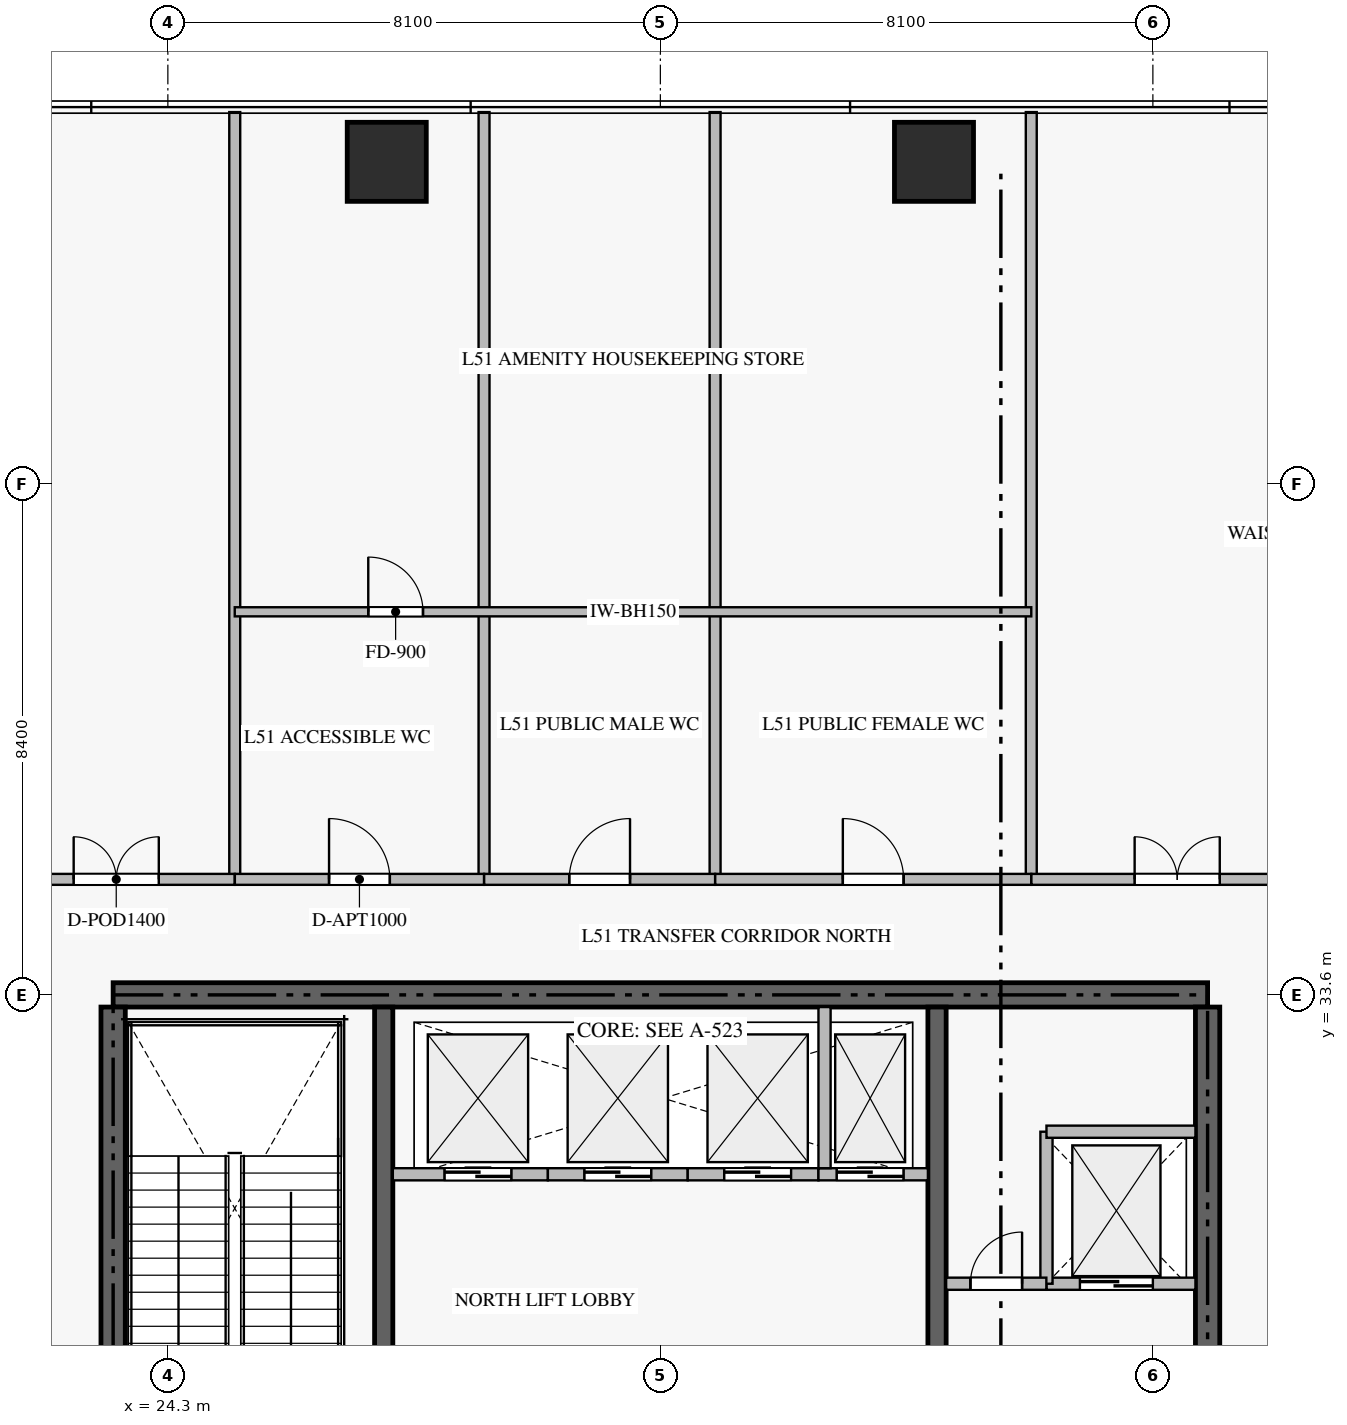
"""IFC4 building model, lengths in metres.
Left out: names, types, materials, properties, quantities, classifications, styles, units other than length and angle.
Written with IfcOpenShell. Run it as: python <this file> out.ifc"""

import sys

from ifc_helpers import new_model, si_unit, direction, frame, frame_2d, origin, origin_2d, place, context, subcontext, project, spatial, rectangle, extrude, source, transform, mapped, element, fill, save


model = new_model("IFC4")
c1 = context("Model", 3, precision=1e-05, world=origin(), true_north=direction((0.0, 1.0)))
c2 = subcontext(c1, "Body", "Model", "MODEL_VIEW")
j1 = project(units=[si_unit("LENGTHUNIT", "METRE"), si_unit("PLANEANGLEUNIT", "RADIAN")], contexts=[c1])
p1 = place(None, origin())
s1 = spatial("IfcSite", under=j1, at=p1, CompositionType="ELEMENT")
p2 = place(p1, origin())
s2 = spatial("IfcBuilding", under=s1, at=p2, CompositionType="ELEMENT")
p3 = place(p2, frame((0.0, 0.0, 204.9)))
s3 = spatial("IfcBuildingStorey", under=s2, at=p3, CompositionType="ELEMENT", Elevation=204.9)
p4 = place(p3, frame((41.4, 33.6, -0.36), z_axis=(0.0, 0.0, 1.0), x_axis=(-1.0, 0.0, 0.0)))
e1 = element("IfcWall", 1, at=p4, inside=s3, PredefinedType="SHEAR", context=c2, shape_type="SweptSolid", body=[
    extrude(rectangle(XDim=18.0, YDim=0.4, at=frame_2d((9.0, 0.0))), origin(), (0.0, 0.0, 1.0), 5.468),
])
p5 = place(p3, frame((23.4, 24.25, -0.36), z_axis=(0.0, 0.0, 1.0), x_axis=(0.0, 1.0, 0.0)))
e2 = element("IfcWall", 2, at=p5, inside=s3, PredefinedType="SHEAR", context=c2, shape_type="SweptSolid", body=[
    extrude(rectangle(XDim=9.15, YDim=0.4, at=frame_2d((4.575, 0.0))), origin(), (0.0, 0.0, 1.0), 5.468),
])
p6 = place(p3, frame((41.4, 27.75, -0.36), z_axis=(0.0, 0.0, 1.0), x_axis=(0.0, 1.0, 0.0)))
e3 = element("IfcWall", 3, at=p6, inside=s3, PredefinedType="SHEAR", context=c2, shape_type="SweptSolid", body=[
    extrude(rectangle(XDim=5.65, YDim=0.4, at=frame_2d((2.825, 0.0))), origin(), (0.0, 0.0, 1.0), 5.468),
])
p7 = place(p3, frame((27.85, 23.55, -0.36), z_axis=(0.0, 0.0, 1.0), x_axis=(0.0, 1.0, 0.0)))
e4 = element("IfcWall", 4, at=p7, inside=s3, PredefinedType="SHEAR", context=c2, shape_type="SweptSolid", body=[
    extrude(rectangle(XDim=9.85, YDim=0.3, at=frame_2d((4.925, 0.0))), origin(), (0.0, 0.0, 1.0), 5.468),
])
p8 = place(p3, frame((36.95, 27.05, -0.36), z_axis=(0.0, 0.0, 1.0), x_axis=(0.0, 1.0, 0.0)))
e5 = element("IfcWall", 5, at=p8, inside=s3, PredefinedType="SHEAR", context=c2, shape_type="SweptSolid", body=[
    extrude(rectangle(XDim=6.35, YDim=0.3, at=frame_2d((3.175, 0.0))), origin(), (0.0, 0.0, 1.0), 5.468),
])
m1 = source(origin(), c2, "Body", "SweptSolid", [
    extrude(rectangle(XDim=1.3, YDim=1.3, at=origin_2d()), origin(), (0.0, 0.0, 1.0), 5.47),
])
for number, where, z_axis, x_axis in (
    (6, (27.9, 47.3, -0.36), (0.0, 0.0, 1.0), (1.0, 0.0, 0.0)),
    (7, (36.9, 47.3, -0.36), (0.0, 0.0, 1.0), (1.0, 0.0, 0.0)),
):
    element("IfcColumn", number, at=place(p3, frame(where, z_axis=z_axis, x_axis=x_axis)), inside=s3, PredefinedType="COLUMN", context=c2, shape_type="MappedRepresentation", body=[
        mapped(m1, transform((0.0, 0.0, 0.0), scale=1.0)),
    ])
p9 = place(p3, frame((38.75, 28.85, 0.0), z_axis=(0.0, 0.0, 1.0), x_axis=(1.0, 0.0, 0.0)))
e8 = element("IfcWall", 8, at=p9, inside=s3, PredefinedType="STANDARD", context=c2, shape_type="SweptSolid", body=[
    extrude(rectangle(XDim=2.45, YDim=0.2, at=frame_2d((1.225, 0.0))), origin(), (0.0, 0.0, 1.0), 5.11),
])
p10 = place(p9, frame((0.55, 0.0, 0.0)))
e9 = element("IfcOpeningElement", 9, at=p10, cuts=e8, PredefinedType="OPENING", context=c2, shape_type="SweptSolid", body=[
    extrude(rectangle(XDim=1.2, YDim=2.2, at=frame_2d((0.6, 1.1))), frame((0.0, 0.11, 0.0), z_axis=(0.0, -1.0, 0.0), x_axis=(1.0, 0.0, 0.0)), (0.0, 0.0, 1.0), 0.22),
])
p11 = place(p3, frame((28.0, 30.65, 0.0), z_axis=(0.0, 0.0, 1.0), x_axis=(1.0, 0.0, 0.0)))
e10 = element("IfcWall", 10, at=p11, inside=s3, PredefinedType="STANDARD", context=c2, shape_type="SweptSolid", body=[
    extrude(rectangle(XDim=2.55, YDim=0.2, at=frame_2d((1.275, 0.0))), origin(), (0.0, 0.0, 1.0), 5.11),
])
p12 = place(p11, frame((0.85, 0.0, 0.0)))
e11 = element("IfcOpeningElement", 11, at=p12, cuts=e10, PredefinedType="OPENING", context=c2, shape_type="SweptSolid", body=[
    extrude(rectangle(XDim=1.1, YDim=2.2, at=frame_2d((0.55, 1.1))), frame((0.0, 0.11, 0.0), z_axis=(0.0, -1.0, 0.0), x_axis=(1.0, 0.0, 0.0)), (0.0, 0.0, 1.0), 0.22),
])
p13 = place(p3, frame((30.55, 30.65, 0.0), z_axis=(0.0, 0.0, 1.0), x_axis=(1.0, 0.0, 0.0)))
e12 = element("IfcWall", 12, at=p13, inside=s3, PredefinedType="STANDARD", context=c2, shape_type="SweptSolid", body=[
    extrude(rectangle(XDim=2.3, YDim=0.2, at=frame_2d((1.15, 0.0))), origin(), (0.0, 0.0, 1.0), 5.11),
])
p14 = place(p13, frame((0.6, 0.0, 0.0)))
e13 = element("IfcOpeningElement", 13, at=p14, cuts=e12, PredefinedType="OPENING", context=c2, shape_type="SweptSolid", body=[
    extrude(rectangle(XDim=1.1, YDim=2.2, at=frame_2d((0.55, 1.1))), frame((0.0, 0.11, 0.0), z_axis=(0.0, -1.0, 0.0), x_axis=(1.0, 0.0, 0.0)), (0.0, 0.0, 1.0), 0.22),
])
p15 = place(p3, frame((32.85, 30.65, 0.0), z_axis=(0.0, 0.0, 1.0), x_axis=(1.0, 0.0, 0.0)))
e14 = element("IfcWall", 14, at=p15, inside=s3, PredefinedType="STANDARD", context=c2, shape_type="SweptSolid", body=[
    extrude(rectangle(XDim=2.15, YDim=0.2, at=frame_2d((1.075, 0.0))), origin(), (0.0, 0.0, 1.0), 5.11),
])
p16 = place(p15, frame((0.6, 0.0, 0.0)))
e15 = element("IfcOpeningElement", 15, at=p16, cuts=e14, PredefinedType="OPENING", context=c2, shape_type="SweptSolid", body=[
    extrude(rectangle(XDim=1.1, YDim=2.2, at=frame_2d((0.55, 1.1))), frame((0.0, 0.11, 0.0), z_axis=(0.0, -1.0, 0.0), x_axis=(1.0, 0.0, 0.0)), (0.0, 0.0, 1.0), 0.22),
])
p17 = place(p3, frame((35.0, 30.65, 0.0), z_axis=(0.0, 0.0, 1.0), x_axis=(1.0, 0.0, 0.0)))
e16 = element("IfcWall", 16, at=p17, inside=s3, PredefinedType="STANDARD", context=c2, shape_type="SweptSolid", body=[
    extrude(rectangle(XDim=1.8, YDim=0.2, at=frame_2d((0.9, 0.0))), origin(), (0.0, 0.0, 1.0), 5.11),
])
p18 = place(p17, frame((0.3, 0.0, 0.0)))
e17 = element("IfcOpeningElement", 17, at=p18, cuts=e16, PredefinedType="OPENING", context=c2, shape_type="SweptSolid", body=[
    extrude(rectangle(XDim=1.1, YDim=2.2, at=frame_2d((0.55, 1.1))), frame((0.0, 0.11, 0.0), z_axis=(0.0, -1.0, 0.0), x_axis=(1.0, 0.0, 0.0)), (0.0, 0.0, 1.0), 0.22),
])
p19 = place(p3, frame((35.1, 30.75, 0.0), z_axis=(0.0, 0.0, 1.0), x_axis=(0.0, 1.0, 0.0)))
e18 = element("IfcWall", 18, at=p19, inside=s3, PredefinedType="STANDARD", context=c2, shape_type="SweptSolid", body=[
    extrude(rectangle(XDim=2.65, YDim=0.2, at=frame_2d((1.325, 0.0))), origin(), (0.0, 0.0, 1.0), 5.11),
])
p20 = place(p3, frame((38.75, 28.85, 0.0), z_axis=(0.0, 0.0, 1.0), x_axis=(0.0, 1.0, 0.0)))
e19 = element("IfcWall", 19, at=p20, inside=s3, PredefinedType="STANDARD", context=c2, shape_type="SweptSolid", body=[
    extrude(rectangle(XDim=2.5, YDim=0.2, at=frame_2d((1.25, 0.0))), origin(), (0.0, 0.0, 1.0), 5.11),
])
p21 = place(p3, frame((38.75, 31.35, 0.0), z_axis=(0.0, 0.0, 1.0), x_axis=(1.0, 0.0, 0.0)))
e20 = element("IfcWall", 20, at=p21, inside=s3, PredefinedType="STANDARD", context=c2, shape_type="SweptSolid", body=[
    extrude(rectangle(XDim=2.45, YDim=0.2, at=frame_2d((1.225, 0.0))), origin(), (0.0, 0.0, 1.0), 5.11),
])
p22 = place(p3, frame((37.1, 28.85, 0.0), z_axis=(0.0, 0.0, 1.0), x_axis=(1.0, 0.0, 0.0)))
e21 = element("IfcWall", 21, at=p22, inside=s3, PredefinedType="STANDARD", context=c2, shape_type="SweptSolid", body=[
    extrude(rectangle(XDim=1.648, YDim=0.2, at=frame_2d((0.824, 0.0))), origin(), (0.0, 0.0, 1.0), 5.11),
])
p23 = place(p22, frame((0.399, 0.0, 0.0)))
e22 = element("IfcOpeningElement", 22, at=p23, cuts=e21, PredefinedType="OPENING", context=c2, shape_type="SweptSolid", body=[
    extrude(rectangle(XDim=0.85, YDim=2.1, at=frame_2d((0.425, 1.05))), frame((0.0, 0.11, 0.0), z_axis=(0.0, -1.0, 0.0), x_axis=(1.0, 0.0, 0.0)), (0.0, 0.0, 1.0), 0.22),
])
for number, where, z_axis, x_axis in (
    (23, (25.4, 35.5, 0.0), (0.0, 0.0, 1.0), (0.0, 1.0, 0.0)),
    (24, (29.5, 35.5, 0.0), (0.0, 0.0, 1.0), (0.0, 1.0, 0.0)),
    (25, (33.3, 35.5, 0.0), (0.0, 0.0, 1.0), (0.0, 1.0, 0.0)),
    (26, (38.5, 35.5, 0.0), (0.0, 0.0, 1.0), (0.0, 1.0, 0.0)),
):
    element("IfcWall", number, at=place(p3, frame(where, z_axis=z_axis, x_axis=x_axis)), inside=s3, PredefinedType="PARTITIONING", context=c2, shape_type="SweptSolid", body=[
        extrude(rectangle(XDim=12.618, YDim=0.18, at=frame_2d((6.309, 0.0))), origin(), (0.0, 0.0, 1.0), 5.11),
    ])
p24 = place(p3, frame((21.502, 35.5, 0.0), z_axis=(0.0, 0.0, 1.0), x_axis=(1.0, 0.0, 0.0)))
e27 = element("IfcWall", 27, at=p24, inside=s3, PredefinedType="PARTITIONING", context=c2, shape_type="SweptSolid", body=[
    extrude(rectangle(XDim=3.898, YDim=0.18, at=frame_2d((1.949, 0.0))), origin(), (0.0, 0.0, 1.0), 5.11),
])
p25 = place(p24, frame((1.249, 0.0, 0.0)))
e28 = element("IfcOpeningElement", 28, at=p25, cuts=e27, PredefinedType="OPENING", context=c2, shape_type="SweptSolid", body=[
    extrude(rectangle(XDim=1.4, YDim=2.25, at=frame_2d((0.7, 1.125))), frame((0.0, 0.1, 0.0), z_axis=(0.0, -1.0, 0.0), x_axis=(1.0, 0.0, 0.0)), (0.0, 0.0, 1.0), 0.2),
])
p26 = place(p3, frame((25.402, 35.5, 0.0), z_axis=(0.0, 0.0, 1.0), x_axis=(1.0, 0.0, 0.0)))
e29 = element("IfcWall", 29, at=p26, inside=s3, PredefinedType="PARTITIONING", context=c2, shape_type="SweptSolid", body=[
    extrude(rectangle(XDim=4.098, YDim=0.18, at=frame_2d((2.049, 0.0))), origin(), (0.0, 0.0, 1.0), 5.11),
])
p27 = place(p26, frame((1.549, 0.0, 0.0)))
e30 = element("IfcOpeningElement", 30, at=p27, cuts=e29, PredefinedType="OPENING", context=c2, shape_type="SweptSolid", body=[
    extrude(rectangle(XDim=1.0, YDim=2.15, at=frame_2d((0.5, 1.075))), frame((0.0, 0.1, 0.0), z_axis=(0.0, -1.0, 0.0), x_axis=(1.0, 0.0, 0.0)), (0.0, 0.0, 1.0), 0.2),
])
p28 = place(p3, frame((29.502, 35.5, 0.0), z_axis=(0.0, 0.0, 1.0), x_axis=(1.0, 0.0, 0.0)))
e31 = element("IfcWall", 31, at=p28, inside=s3, PredefinedType="PARTITIONING", context=c2, shape_type="SweptSolid", body=[
    extrude(rectangle(XDim=3.798, YDim=0.18, at=frame_2d((1.899, 0.0))), origin(), (0.0, 0.0, 1.0), 5.11),
])
p29 = place(p28, frame((1.399, 0.0, 0.0)))
e32 = element("IfcOpeningElement", 32, at=p29, cuts=e31, PredefinedType="OPENING", context=c2, shape_type="SweptSolid", body=[
    extrude(rectangle(XDim=1.0, YDim=2.15, at=frame_2d((0.5, 1.075))), frame((0.0, 0.1, 0.0), z_axis=(0.0, -1.0, 0.0), x_axis=(1.0, 0.0, 0.0)), (0.0, 0.0, 1.0), 0.2),
])
p30 = place(p3, frame((33.302, 35.5, 0.0), z_axis=(0.0, 0.0, 1.0), x_axis=(1.0, 0.0, 0.0)))
e33 = element("IfcWall", 33, at=p30, inside=s3, PredefinedType="PARTITIONING", context=c2, shape_type="SweptSolid", body=[
    extrude(rectangle(XDim=5.198, YDim=0.18, at=frame_2d((2.599, 0.0))), origin(), (0.0, 0.0, 1.0), 5.11),
])
p31 = place(p30, frame((2.099, 0.0, 0.0)))
e34 = element("IfcOpeningElement", 34, at=p31, cuts=e33, PredefinedType="OPENING", context=c2, shape_type="SweptSolid", body=[
    extrude(rectangle(XDim=1.0, YDim=2.15, at=frame_2d((0.5, 1.075))), frame((0.0, 0.1, 0.0), z_axis=(0.0, -1.0, 0.0), x_axis=(1.0, 0.0, 0.0)), (0.0, 0.0, 1.0), 0.2),
])
p32 = place(p3, frame((38.502, 35.5, 0.0), z_axis=(0.0, 0.0, 1.0), x_axis=(1.0, 0.0, 0.0)))
e35 = element("IfcWall", 35, at=p32, inside=s3, PredefinedType="PARTITIONING", context=c2, shape_type="SweptSolid", body=[
    extrude(rectangle(XDim=4.796, YDim=0.18, at=frame_2d((2.398, 0.0))), origin(), (0.0, 0.0, 1.0), 5.11),
])
p33 = place(p32, frame((1.698, 0.0, 0.0)))
e36 = element("IfcOpeningElement", 36, at=p33, cuts=e35, PredefinedType="OPENING", context=c2, shape_type="SweptSolid", body=[
    extrude(rectangle(XDim=1.4, YDim=2.25, at=frame_2d((0.7, 1.125))), frame((0.0, 0.1, 0.0), z_axis=(0.0, -1.0, 0.0), x_axis=(1.0, 0.0, 0.0)), (0.0, 0.0, 1.0), 0.2),
])
p34 = place(p3, frame((25.4, 39.9, 0.0), z_axis=(0.0, 0.0, 1.0), x_axis=(1.0, 0.0, 0.0)))
e37 = element("IfcWall", 37, at=p34, inside=s3, PredefinedType="PARTITIONING", context=c2, shape_type="SweptSolid", body=[
    extrude(rectangle(XDim=13.1, YDim=0.15, at=frame_2d((6.55, 0.0))), origin(), (0.0, 0.0, 1.0), 3.945),
])
p35 = place(p34, frame((2.196, 0.0, 0.0)))
e38 = element("IfcOpeningElement", 38, at=p35, cuts=e37, PredefinedType="OPENING", context=c2, shape_type="SweptSolid", body=[
    extrude(rectangle(XDim=0.9, YDim=2.1, at=frame_2d((0.45, 1.05))), frame((0.0, 0.085, 0.0), z_axis=(0.0, -1.0, 0.0), x_axis=(1.0, 0.0, 0.0)), (0.0, 0.0, 1.0), 0.17),
])
m2 = source(origin(), c2, "Body", "SweptSolid", [
    extrude(rectangle(XDim=1.2, YDim=2.2, at=frame_2d((0.6, 1.1))), frame((0.0, 0.025, 0.0), z_axis=(0.0, -1.0, 0.0), x_axis=(1.0, 0.0, 0.0)), (0.0, 0.0, 1.0), 0.05),
])
p36 = place(p10, origin())
e39 = element("IfcDoor", 39, at=p36, inside=s3, OperationType="DOUBLE_DOOR_SLIDING", PredefinedType="DOOR", context=c2, shape_type="MappedRepresentation", body=[
    mapped(m2, transform((0.0, 0.0, 0.0), scale=1.0)),
])
fill(e9, e39)
m3 = source(origin(), c2, "Body", "SweptSolid", [
    extrude(rectangle(XDim=1.1, YDim=2.2, at=frame_2d((0.55, 1.1))), frame((0.0, 0.025, 0.0), z_axis=(0.0, -1.0, 0.0), x_axis=(1.0, 0.0, 0.0)), (0.0, 0.0, 1.0), 0.05),
])
p37 = place(p12, origin())
e40 = element("IfcDoor", 40, at=p37, inside=s3, OperationType="DOUBLE_DOOR_SLIDING", PredefinedType="DOOR", context=c2, shape_type="MappedRepresentation", body=[
    mapped(m3, transform((0.0, 0.0, 0.0), scale=1.0)),
])
fill(e11, e40)
p38 = place(p14, origin())
e41 = element("IfcDoor", 41, at=p38, inside=s3, OperationType="DOUBLE_DOOR_SLIDING", PredefinedType="DOOR", context=c2, shape_type="MappedRepresentation", body=[
    mapped(m3, transform((0.0, 0.0, 0.0), scale=1.0)),
])
fill(e13, e41)
p39 = place(p16, origin())
e42 = element("IfcDoor", 42, at=p39, inside=s3, OperationType="DOUBLE_DOOR_SLIDING", PredefinedType="DOOR", context=c2, shape_type="MappedRepresentation", body=[
    mapped(m3, transform((0.0, 0.0, 0.0), scale=1.0)),
])
fill(e15, e42)
p40 = place(p18, origin())
e43 = element("IfcDoor", 43, at=p40, inside=s3, OperationType="DOUBLE_DOOR_SLIDING", PredefinedType="DOOR", context=c2, shape_type="MappedRepresentation", body=[
    mapped(m3, transform((0.0, 0.0, 0.0), scale=1.0)),
])
fill(e17, e43)
m4 = source(origin(), c2, "Body", "SweptSolid", [
    extrude(rectangle(XDim=0.85, YDim=2.1, at=frame_2d((0.425, 1.05))), frame((0.0, 0.025, 0.0), z_axis=(0.0, -1.0, 0.0), x_axis=(1.0, 0.0, 0.0)), (0.0, 0.0, 1.0), 0.05),
])
p41 = place(p23, origin())
e44 = element("IfcDoor", 44, at=p41, inside=s3, OperationType="SINGLE_SWING_RIGHT", PredefinedType="DOOR", context=c2, shape_type="MappedRepresentation", body=[
    mapped(m4, transform((0.0, 0.0, 0.0), scale=1.0)),
])
fill(e22, e44)
m5 = source(origin(), c2, "Body", "SweptSolid", [
    extrude(rectangle(XDim=1.4, YDim=2.25, at=frame_2d((0.7, 1.125))), frame((0.0, 0.025, 0.0), z_axis=(0.0, -1.0, 0.0), x_axis=(1.0, 0.0, 0.0)), (0.0, 0.0, 1.0), 0.05),
])
p42 = place(p25, origin())
e45 = element("IfcDoor", 45, at=p42, inside=s3, OperationType="DOUBLE_DOOR_SINGLE_SWING", PredefinedType="DOOR", context=c2, shape_type="MappedRepresentation", body=[
    mapped(m5, transform((0.0, 0.0, 0.0), scale=1.0)),
])
fill(e28, e45)
m6 = source(origin(), c2, "Body", "SweptSolid", [
    extrude(rectangle(XDim=1.0, YDim=2.15, at=frame_2d((0.5, 1.075))), frame((0.0, 0.025, 0.0), z_axis=(0.0, -1.0, 0.0), x_axis=(1.0, 0.0, 0.0)), (0.0, 0.0, 1.0), 0.05),
])
p43 = place(p27, origin())
e46 = element("IfcDoor", 46, at=p43, inside=s3, OperationType="SINGLE_SWING_LEFT", PredefinedType="DOOR", context=c2, shape_type="MappedRepresentation", body=[
    mapped(m6, transform((0.0, 0.0, 0.0), scale=1.0)),
])
fill(e30, e46)
p44 = place(p29, origin())
e47 = element("IfcDoor", 47, at=p44, inside=s3, OperationType="SINGLE_SWING_RIGHT", PredefinedType="DOOR", context=c2, shape_type="MappedRepresentation", body=[
    mapped(m6, transform((0.0, 0.0, 0.0), scale=1.0)),
])
fill(e32, e47)
p45 = place(p31, origin())
e48 = element("IfcDoor", 48, at=p45, inside=s3, OperationType="SINGLE_SWING_LEFT", PredefinedType="DOOR", context=c2, shape_type="MappedRepresentation", body=[
    mapped(m6, transform((0.0, 0.0, 0.0), scale=1.0)),
])
fill(e34, e48)
p46 = place(p33, origin())
e49 = element("IfcDoor", 49, at=p46, inside=s3, OperationType="DOUBLE_DOOR_SINGLE_SWING", PredefinedType="DOOR", context=c2, shape_type="MappedRepresentation", body=[
    mapped(m5, transform((0.0, 0.0, 0.0), scale=1.0)),
])
fill(e36, e49)
m7 = source(origin(), c2, "Body", "SweptSolid", [
    extrude(rectangle(XDim=0.9, YDim=2.1, at=frame_2d((0.45, 1.05))), frame((0.0, 0.025, 0.0), z_axis=(0.0, -1.0, 0.0), x_axis=(1.0, 0.0, 0.0)), (0.0, 0.0, 1.0), 0.05),
])
p47 = place(p35, origin())
e50 = element("IfcDoor", 50, at=p47, inside=s3, OperationType="SINGLE_SWING_LEFT", PredefinedType="DOOR", context=c2, shape_type="MappedRepresentation", body=[
    mapped(m7, transform((0.0, 0.0, 0.0), scale=1.0)),
])
fill(e38, e50)
save(model, sys.argv[1])
